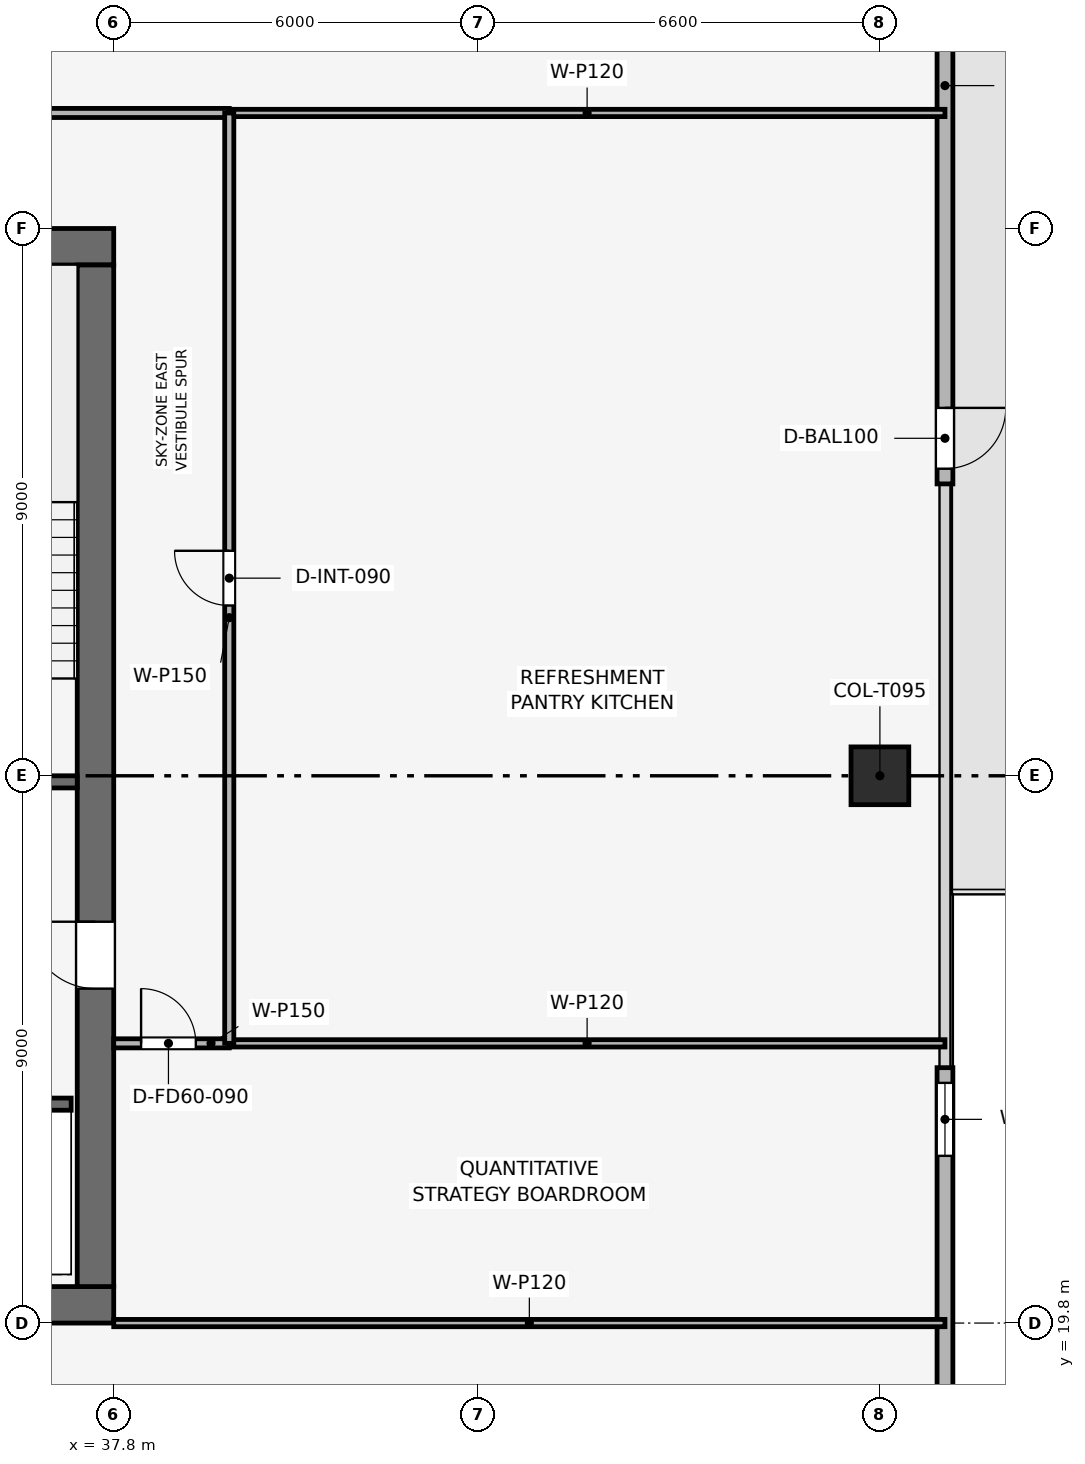
"""IFC4 building model, lengths in metres.
Left out: names, types, materials, properties, quantities, classifications, styles, units other than length and angle.
Written with IfcOpenShell. Run it as: python <this file> out.ifc"""

import sys

from ifc_helpers import new_model, si_unit, direction, frame, frame_2d, origin, origin_2d, place, context, subcontext, project, spatial, rectangle, extrude, element, fill, save


model = new_model("IFC4")
c1 = context("Model", 3, precision=1e-05, world=origin(), true_north=direction((0.0, 1.0)))
c2 = subcontext(c1, "Body", "Model", "MODEL_VIEW")
j1 = project(units=[si_unit("LENGTHUNIT", "METRE"), si_unit("PLANEANGLEUNIT", "RADIAN")], contexts=[c1])
p1 = place(None, origin())
s1 = spatial("IfcSite", under=j1, at=p1, CompositionType="ELEMENT")
p2 = place(p1, origin())
s2 = spatial("IfcBuilding", under=s1, at=p2, CompositionType="ELEMENT")
p3 = place(p2, frame((0.0, 0.0, 299.25)))
s3 = spatial("IfcBuildingStorey", under=s2, at=p3, CompositionType="ELEMENT", Elevation=299.25)
p4 = place(p3, frame((19.8, 20.1, 0.0), z_axis=(0.0, 0.0, 1.0), x_axis=(1.0, 0.0, 0.0)))
e1 = element("IfcWall", 1, at=p4, inside=s3, PredefinedType="SHEAR", context=c2, shape_type="SweptSolid", body=[
    extrude(rectangle(XDim=18.0, YDim=0.6, at=frame_2d((9.0, 0.0))), origin(), (0.0, 0.0, 1.0), 3.75),
])
p5 = place(p3, frame((19.8, 37.5, 0.0), z_axis=(0.0, 0.0, 1.0), x_axis=(1.0, 0.0, 0.0)))
e2 = element("IfcWall", 2, at=p5, inside=s3, PredefinedType="SHEAR", context=c2, shape_type="SweptSolid", body=[
    extrude(rectangle(XDim=18.0, YDim=0.6, at=frame_2d((9.0, 0.0))), origin(), (0.0, 0.0, 1.0), 3.75),
])
p6 = place(p5, frame((7.05, 0.0, 0.0)))
e3 = element("IfcOpeningElement", 3, at=p6, cuts=e2, PredefinedType="OPENING", context=c2, shape_type="SweptSolid", body=[
    extrude(rectangle(XDim=1.1, YDim=2.15, at=frame_2d((0.55, 1.075))), frame((0.0, 0.31, 0.0), z_axis=(0.0, -1.0, 0.0), x_axis=(1.0, 0.0, 0.0)), (0.0, 0.0, 1.0), 0.62),
])
p7 = place(p3, frame((37.5, 20.4, 0.0), z_axis=(0.0, 0.0, 1.0), x_axis=(0.0, 1.0, 0.0)))
e4 = element("IfcWall", 4, at=p7, inside=s3, PredefinedType="SHEAR", context=c2, shape_type="SweptSolid", body=[
    extrude(rectangle(XDim=16.8, YDim=0.6, at=frame_2d((8.4, 0.0))), origin(), (0.0, 0.0, 1.0), 3.75),
])
p8 = place(p7, frame((4.9, 0.0, 0.0)))
e5 = element("IfcOpeningElement", 5, at=p8, cuts=e4, PredefinedType="OPENING", context=c2, shape_type="SweptSolid", body=[
    extrude(rectangle(XDim=1.1, YDim=2.15, at=frame_2d((0.55, 1.075))), frame((0.0, 0.31, 0.0), z_axis=(0.0, -1.0, 0.0), x_axis=(1.0, 0.0, 0.0)), (0.0, 0.0, 1.0), 0.62),
])
p9 = place(p3, frame((50.4, 28.8, 0.003), z_axis=(0.0, 0.0, 1.0), x_axis=(1.0, 0.0, 0.0)))
e6 = element("IfcColumn", 6, at=p9, inside=s3, PredefinedType="COLUMN", context=c2, shape_type="SweptSolid", body=[
    extrude(rectangle(XDim=0.95, YDim=0.95, at=origin_2d()), origin(), (0.0, 0.0, 1.0), 3.504),
])
p10 = place(p3, frame((51.47, 45.3, 0.0), z_axis=(0.0, 0.0, 1.0), x_axis=(0.0, -1.0, 0.0)))
e7 = element("IfcWall", 7, at=p10, inside=s3, PredefinedType="SOLIDWALL", context=c2, shape_type="SweptSolid", body=[
    extrude(rectangle(XDim=11.7, YDim=0.26, at=frame_2d((5.85, 0.0))), origin(), (0.0, 0.0, 1.0), 3.51),
])
p11 = place(p10, frame((10.45, 0.0, 0.0)))
e8 = element("IfcOpeningElement", 8, at=p11, cuts=e7, PredefinedType="OPENING", context=c2, shape_type="SweptSolid", body=[
    extrude(rectangle(XDim=1.0, YDim=2.2, at=frame_2d((0.5, 1.1))), frame((0.0, 0.14, 0.0), z_axis=(0.0, -1.0, 0.0), x_axis=(1.0, 0.0, 0.0)), (0.0, 0.0, 1.0), 0.28),
])
p12 = place(p3, frame((51.47, 24.0, 0.0), z_axis=(0.0, 0.0, 1.0), x_axis=(0.0, -1.0, 0.0)))
e9 = element("IfcWall", 9, at=p12, inside=s3, PredefinedType="SOLIDWALL", context=c2, shape_type="SweptSolid", body=[
    extrude(rectangle(XDim=11.7, YDim=0.26, at=frame_2d((5.85, 0.0))), origin(), (0.0, 0.0, 1.0), 3.51),
])
p13 = place(p12, frame((0.25, 0.0, 0.9)))
e10 = element("IfcOpeningElement", 10, at=p13, cuts=e9, PredefinedType="OPENING", context=c2, shape_type="SweptSolid", body=[
    extrude(rectangle(XDim=1.2, YDim=2.1, at=frame_2d((0.6, 1.05))), frame((0.0, 0.14, 0.0), z_axis=(0.0, -1.0, 0.0), x_axis=(1.0, 0.0, 0.0)), (0.0, 0.0, 1.0), 0.28),
])
p14 = place(p3, frame((34.05, 28.7, 0.0), z_axis=(0.0, 0.0, 1.0), x_axis=(1.0, 0.0, 0.0)))
e11 = element("IfcWall", 11, at=p14, inside=s3, PredefinedType="SHEAR", context=c2, shape_type="SweptSolid", body=[
    extrude(rectangle(XDim=3.15, YDim=0.2, at=frame_2d((1.575, 0.0))), origin(), (0.0, 0.0, 1.0), 3.51),
])
p15 = place(p14, frame((0.8, 0.0, 0.0)))
e12 = element("IfcOpeningElement", 12, at=p15, cuts=e11, PredefinedType="OPENING", context=c2, shape_type="SweptSolid", body=[
    extrude(rectangle(XDim=1.0, YDim=2.1, at=frame_2d((0.5, 1.05))), frame((0.0, 0.11, 0.0), z_axis=(0.0, -1.0, 0.0), x_axis=(1.0, 0.0, 0.0)), (0.0, 0.0, 1.0), 0.22),
])
p16 = place(p3, frame((34.05, 23.4, 0.0), z_axis=(0.0, 0.0, 1.0), x_axis=(1.0, 0.0, 0.0)))
e13 = element("IfcWall", 13, at=p16, inside=s3, PredefinedType="SHEAR", context=c2, shape_type="SweptSolid", body=[
    extrude(rectangle(XDim=3.05, YDim=0.2, at=frame_2d((1.525, 0.0))), origin(), (0.0, 0.0, 1.0), 3.51),
])
p17 = place(p16, frame((1.2, 0.0, 0.0)))
e14 = element("IfcOpeningElement", 14, at=p17, cuts=e13, PredefinedType="OPENING", context=c2, shape_type="SweptSolid", body=[
    extrude(rectangle(XDim=1.1, YDim=2.15, at=frame_2d((0.55, 1.075))), frame((0.0, 0.11, 0.0), z_axis=(0.0, -1.0, 0.0), x_axis=(1.0, 0.0, 0.0)), (0.0, 0.0, 1.0), 0.22),
])
p18 = place(p3, frame((37.8, 19.8, 0.0), z_axis=(0.0, 0.0, 1.0), x_axis=(1.0, 0.0, 0.0)))
e15 = element("IfcWall", 15, at=p18, inside=s3, PredefinedType="PARTITIONING", context=c2, shape_type="SweptSolid", body=[
    extrude(rectangle(XDim=13.67, YDim=0.12, at=frame_2d((6.835, 0.0))), origin(), (0.0, 0.0, 1.0), 3.095),
])
p19 = place(p3, frame((37.8, 24.4, 0.0), z_axis=(0.0, 0.0, 1.0), x_axis=(1.0, 0.0, 0.0)))
e16 = element("IfcWall", 16, at=p19, inside=s3, PredefinedType="PARTITIONING", context=c2, shape_type="SweptSolid", body=[
    extrude(rectangle(XDim=1.9, YDim=0.15, at=frame_2d((0.95, 0.0))), origin(), (0.0, 0.0, 1.0), 3.51),
])
p20 = place(p19, frame((0.45, 0.0, 0.0)))
e17 = element("IfcOpeningElement", 17, at=p20, cuts=e16, PredefinedType="OPENING", context=c2, shape_type="SweptSolid", body=[
    extrude(rectangle(XDim=0.9, YDim=2.1, at=frame_2d((0.45, 1.05))), frame((0.0, 0.085, 0.0), z_axis=(0.0, -1.0, 0.0), x_axis=(1.0, 0.0, 0.0)), (0.0, 0.0, 1.0), 0.17),
])
p21 = place(p3, frame((39.7, 24.4, 0.0), z_axis=(0.0, 0.0, 1.0), x_axis=(1.0, 0.0, 0.0)))
e18 = element("IfcWall", 18, at=p21, inside=s3, PredefinedType="PARTITIONING", context=c2, shape_type="SweptSolid", body=[
    extrude(rectangle(XDim=11.77, YDim=0.12, at=frame_2d((5.885, 0.0))), origin(), (0.0, 0.0, 1.0), 3.135),
])
p22 = place(p3, frame((39.7, 39.7, 0.0), z_axis=(0.0, 0.0, 1.0), x_axis=(1.0, 0.0, 0.0)))
e19 = element("IfcWall", 19, at=p22, inside=s3, PredefinedType="PARTITIONING", context=c2, shape_type="SweptSolid", body=[
    extrude(rectangle(XDim=11.77, YDim=0.12, at=frame_2d((5.885, 0.0))), origin(), (0.0, 0.0, 1.0), 3.095),
])
p23 = place(p3, frame((17.9, 39.7, 0.0), z_axis=(0.0, 0.0, 1.0), x_axis=(1.0, 0.0, 0.0)))
e20 = element("IfcWall", 20, at=p23, inside=s3, PredefinedType="PARTITIONING", context=c2, shape_type="SweptSolid", body=[
    extrude(rectangle(XDim=21.8, YDim=0.15, at=frame_2d((10.9, 0.0))), origin(), (0.0, 0.0, 1.0), 3.095),
])
p24 = place(p23, frame((0.7, 0.0, 0.0)))
e21 = element("IfcOpeningElement", 21, at=p24, cuts=e20, PredefinedType="OPENING", context=c2, shape_type="SweptSolid", body=[
    extrude(rectangle(XDim=0.9, YDim=2.1, at=frame_2d((0.45, 1.05))), frame((0.0, 0.085, 0.0), z_axis=(0.0, -1.0, 0.0), x_axis=(1.0, 0.0, 0.0)), (0.0, 0.0, 1.0), 0.17),
])
p25 = place(p23, frame((6.053, 0.0, 0.0)))
e22 = element("IfcOpeningElement", 22, at=p25, cuts=e20, PredefinedType="OPENING", context=c2, shape_type="SweptSolid", body=[
    extrude(rectangle(XDim=0.9, YDim=2.1, at=frame_2d((0.45, 1.05))), frame((0.0, 0.085, 0.0), z_axis=(0.0, -1.0, 0.0), x_axis=(1.0, 0.0, 0.0)), (0.0, 0.0, 1.0), 0.17),
])
p26 = place(p23, frame((15.803, 0.0, 0.0)))
e23 = element("IfcOpeningElement", 23, at=p26, cuts=e20, PredefinedType="OPENING", context=c2, shape_type="SweptSolid", body=[
    extrude(rectangle(XDim=0.9, YDim=2.1, at=frame_2d((0.45, 1.05))), frame((0.0, 0.085, 0.0), z_axis=(0.0, -1.0, 0.0), x_axis=(1.0, 0.0, 0.0)), (0.0, 0.0, 1.0), 0.17),
])
p27 = place(p3, frame((39.7, 24.4, 0.0), z_axis=(0.0, 0.0, 1.0), x_axis=(0.0, 1.0, 0.0)))
e24 = element("IfcWall", 24, at=p27, inside=s3, PredefinedType="PARTITIONING", context=c2, shape_type="SweptSolid", body=[
    extrude(rectangle(XDim=15.3, YDim=0.15, at=frame_2d((7.65, 0.0))), origin(), (0.0, 0.0, 1.0), 3.095),
])
p28 = place(p27, frame((7.2, 0.0, 0.0)))
e25 = element("IfcOpeningElement", 25, at=p28, cuts=e24, PredefinedType="OPENING", context=c2, shape_type="SweptSolid", body=[
    extrude(rectangle(XDim=0.9, YDim=2.1, at=frame_2d((0.45, 1.05))), frame((0.0, 0.085, 0.0), z_axis=(0.0, -1.0, 0.0), x_axis=(1.0, 0.0, 0.0)), (0.0, 0.0, 1.0), 0.17),
])
p29 = place(p11, origin())
e26 = element("IfcDoor", 26, at=p29, inside=s3, OperationType="SINGLE_SWING_LEFT", PredefinedType="DOOR", context=c2, shape_type="SweptSolid", body=[
    extrude(rectangle(XDim=1.0, YDim=2.2, at=frame_2d((0.5, 1.1))), frame((0.0, 0.025, 0.0), z_axis=(0.0, -1.0, 0.0), x_axis=(1.0, 0.0, 0.0)), (0.0, 0.0, 1.0), 0.05),
])
fill(e8, e26)
p30 = place(p13, origin())
e27 = element("IfcWindow", 27, at=p30, inside=s3, PartitioningType="SINGLE_PANEL", PredefinedType="WINDOW", context=c2, shape_type="SweptSolid", body=[
    extrude(rectangle(XDim=1.2, YDim=2.1, at=frame_2d((0.6, 1.05))), frame((0.0, 0.03, 0.0), z_axis=(0.0, -1.0, 0.0), x_axis=(1.0, 0.0, 0.0)), (0.0, 0.0, 1.0), 0.06),
])
fill(e10, e27)
p31 = place(p20, origin())
e28 = element("IfcDoor", 28, at=p31, inside=s3, OperationType="SINGLE_SWING_LEFT", PredefinedType="DOOR", context=c2, shape_type="SweptSolid", body=[
    extrude(rectangle(XDim=0.9, YDim=2.1, at=frame_2d((0.45, 1.05))), frame((0.0, 0.025, 0.0), z_axis=(0.0, -1.0, 0.0), x_axis=(1.0, 0.0, 0.0)), (0.0, 0.0, 1.0), 0.05),
])
fill(e17, e28)
p32 = place(p28, origin())
e29 = element("IfcDoor", 29, at=p32, inside=s3, OperationType="SINGLE_SWING_RIGHT", PredefinedType="DOOR", context=c2, shape_type="SweptSolid", body=[
    extrude(rectangle(XDim=0.9, YDim=2.1, at=frame_2d((0.45, 1.05))), frame((0.0, 0.025, 0.0), z_axis=(0.0, -1.0, 0.0), x_axis=(1.0, 0.0, 0.0)), (0.0, 0.0, 1.0), 0.05),
])
fill(e25, e29)
p33 = place(p8, origin())
e30 = element("IfcDoor", 30, at=p33, inside=s3, OperationType="SINGLE_SWING_RIGHT", PredefinedType="DOOR", context=c2, shape_type="SweptSolid", body=[
    extrude(rectangle(XDim=1.1, YDim=2.15, at=frame_2d((0.55, 1.075))), frame((0.0, 0.025, 0.0), z_axis=(0.0, -1.0, 0.0), x_axis=(1.0, 0.0, 0.0)), (0.0, 0.0, 1.0), 0.05),
])
fill(e5, e30)
save(model, sys.argv[1])
